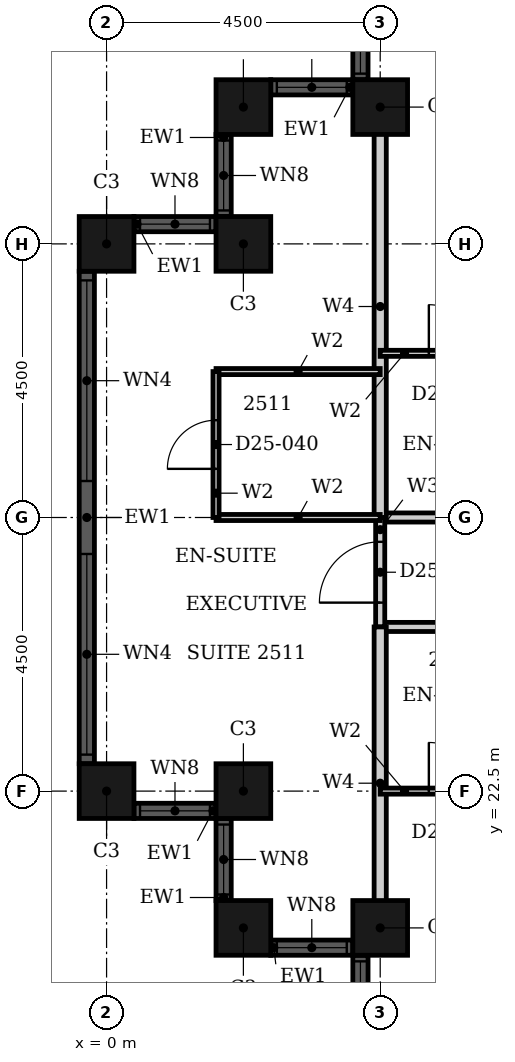
"""IFC4 building model, lengths in metres.
Left out: names, types, materials, properties, quantities, classifications, styles, units other than length and angle.
Written with IfcOpenShell. Run it as: python <this file> out.ifc"""

import sys

from ifc_helpers import new_model, si_unit, direction, frame, frame_2d, origin, origin_2d, place, context, subcontext, project, spatial, rectangle, hollow_rectangle, extrude, element, fill, save


model = new_model("IFC4")
c1 = context("Model", 3, precision=1e-05, world=origin(), true_north=direction((0.0, 1.0)))
c2 = subcontext(c1, "Body", "Model", "MODEL_VIEW")
j1 = project(units=[si_unit("LENGTHUNIT", "METRE"), si_unit("PLANEANGLEUNIT", "RADIAN")], contexts=[c1])
p1 = place(None, origin())
s1 = spatial("IfcSite", under=j1, at=p1, CompositionType="ELEMENT")
p2 = place(p1, origin())
s2 = spatial("IfcBuilding", under=s1, at=p2, CompositionType="ELEMENT")
p3 = place(p2, frame((0.0, 0.0, 104.4)))
s3 = spatial("IfcBuildingStorey", under=s2, at=p3, CompositionType="ELEMENT", Elevation=104.4)
for number, where, z_axis, x_axis in (
    (1, (4.5, 33.75, 0.0), (0.0, 0.0, 1.0), (1.0, 0.0, 0.0)),
    (2, (2.25, 33.75, 0.0), (0.0, 0.0, 1.0), (1.0, 0.0, 0.0)),
    (3, (2.25, 31.5, 0.0), (0.0, 0.0, 1.0), (1.0, 0.0, 0.0)),
    (4, (0.0, 31.5, 0.0), (0.0, 0.0, 1.0), (1.0, 0.0, 0.0)),
    (5, (0.0, 22.5, 0.0), (0.0, 0.0, 1.0), (1.0, 0.0, 0.0)),
    (6, (2.25, 22.5, 0.0), (0.0, 0.0, 1.0), (1.0, 0.0, 0.0)),
    (7, (2.25, 20.25, 0.0), (0.0, 0.0, 1.0), (1.0, 0.0, 0.0)),
    (8, (4.5, 20.25, 0.0), (0.0, 0.0, 1.0), (1.0, 0.0, 0.0)),
):
    element("IfcColumn", number, at=place(p3, frame(where, z_axis=z_axis, x_axis=x_axis)), inside=s3, PredefinedType="COLUMN", context=c2, shape_type="SweptSolid", body=[
        extrude(hollow_rectangle(XDim=0.9, YDim=0.9, WallThickness=0.028, at=origin_2d()), origin(), (0.0, 0.0, 1.0), 3.6),
    ])
p4 = place(p3, frame((4.175, 35.55, 0.0), z_axis=(0.0, 0.0, 1.0), x_axis=(0.0, -1.0, 0.0)))
e9 = element("IfcWall", 9, at=p4, inside=s3, PredefinedType="SOLIDWALL", context=c2, shape_type="SweptSolid", body=[
    extrude(rectangle(XDim=1.35, YDim=0.25, at=frame_2d((0.675, 0.0))), origin(), (0.0, 0.0, 1.0), 3.6),
])
p5 = place(p4, frame((0.1, 0.0, 0.9)))
e10 = element("IfcOpeningElement", 10, at=p5, cuts=e9, PredefinedType="OPENING", context=c2, shape_type="SweptSolid", body=[
    extrude(rectangle(XDim=1.15, YDim=2.08, at=frame_2d((0.575, 1.04))), frame((0.0, 0.135, 0.0), z_axis=(0.0, -1.0, 0.0), x_axis=(1.0, 0.0, 0.0)), (0.0, 0.0, 1.0), 0.27),
])
p6 = place(p3, frame((4.05, 34.075, 0.0), z_axis=(0.0, 0.0, 1.0), x_axis=(-1.0, 0.0, 0.0)))
e11 = element("IfcWall", 11, at=p6, inside=s3, PredefinedType="SOLIDWALL", context=c2, shape_type="SweptSolid", body=[
    extrude(rectangle(XDim=1.35, YDim=0.25, at=frame_2d((0.675, 0.0))), origin(), (0.0, 0.0, 1.0), 3.6),
])
p7 = place(p6, frame((0.1, 0.0, 0.9)))
e12 = element("IfcOpeningElement", 12, at=p7, cuts=e11, PredefinedType="OPENING", context=c2, shape_type="SweptSolid", body=[
    extrude(rectangle(XDim=1.15, YDim=2.08, at=frame_2d((0.575, 1.04))), frame((0.0, 0.135, 0.0), z_axis=(0.0, -1.0, 0.0), x_axis=(1.0, 0.0, 0.0)), (0.0, 0.0, 1.0), 0.27),
])
p8 = place(p3, frame((1.925, 33.3, 0.0), z_axis=(0.0, 0.0, 1.0), x_axis=(0.0, -1.0, 0.0)))
e13 = element("IfcWall", 13, at=p8, inside=s3, PredefinedType="SOLIDWALL", context=c2, shape_type="SweptSolid", body=[
    extrude(rectangle(XDim=1.35, YDim=0.25, at=frame_2d((0.675, 0.0))), origin(), (0.0, 0.0, 1.0), 3.6),
])
p9 = place(p8, frame((0.1, 0.0, 0.9)))
e14 = element("IfcOpeningElement", 14, at=p9, cuts=e13, PredefinedType="OPENING", context=c2, shape_type="SweptSolid", body=[
    extrude(rectangle(XDim=1.15, YDim=2.08, at=frame_2d((0.575, 1.04))), frame((0.0, 0.135, 0.0), z_axis=(0.0, -1.0, 0.0), x_axis=(1.0, 0.0, 0.0)), (0.0, 0.0, 1.0), 0.27),
])
p10 = place(p3, frame((1.8, 31.825, 0.0), z_axis=(0.0, 0.0, 1.0), x_axis=(-1.0, 0.0, 0.0)))
e15 = element("IfcWall", 15, at=p10, inside=s3, PredefinedType="SOLIDWALL", context=c2, shape_type="SweptSolid", body=[
    extrude(rectangle(XDim=1.35, YDim=0.25, at=frame_2d((0.675, 0.0))), origin(), (0.0, 0.0, 1.0), 3.6),
])
p11 = place(p10, frame((0.1, 0.0, 0.9)))
e16 = element("IfcOpeningElement", 16, at=p11, cuts=e15, PredefinedType="OPENING", context=c2, shape_type="SweptSolid", body=[
    extrude(rectangle(XDim=1.15, YDim=2.08, at=frame_2d((0.575, 1.04))), frame((0.0, 0.135, 0.0), z_axis=(0.0, -1.0, 0.0), x_axis=(1.0, 0.0, 0.0)), (0.0, 0.0, 1.0), 0.27),
])
p12 = place(p3, frame((-0.325, 31.05, 0.0), z_axis=(0.0, 0.0, 1.0), x_axis=(0.0, -1.0, 0.0)))
e17 = element("IfcWall", 17, at=p12, inside=s3, PredefinedType="SOLIDWALL", context=c2, shape_type="SweptSolid", body=[
    extrude(rectangle(XDim=8.1, YDim=0.25, at=frame_2d((4.05, 0.0))), origin(), (0.0, 0.0, 1.0), 3.6),
])
p13 = place(p12, frame((0.15, 0.0, 0.9)))
e18 = element("IfcOpeningElement", 18, at=p13, cuts=e17, PredefinedType="OPENING", context=c2, shape_type="SweptSolid", body=[
    extrude(rectangle(XDim=3.3, YDim=2.08, at=frame_2d((1.65, 1.04))), frame((0.0, 0.135, 0.0), z_axis=(0.0, -1.0, 0.0), x_axis=(1.0, 0.0, 0.0)), (0.0, 0.0, 1.0), 0.27),
])
p14 = place(p12, frame((4.65, 0.0, 0.9)))
e19 = element("IfcOpeningElement", 19, at=p14, cuts=e17, PredefinedType="OPENING", context=c2, shape_type="SweptSolid", body=[
    extrude(rectangle(XDim=3.3, YDim=2.08, at=frame_2d((1.65, 1.04))), frame((0.0, 0.135, 0.0), z_axis=(0.0, -1.0, 0.0), x_axis=(1.0, 0.0, 0.0)), (0.0, 0.0, 1.0), 0.27),
])
p15 = place(p3, frame((0.45, 22.175, 0.0), z_axis=(0.0, 0.0, 1.0), x_axis=(1.0, 0.0, 0.0)))
e20 = element("IfcWall", 20, at=p15, inside=s3, PredefinedType="SOLIDWALL", context=c2, shape_type="SweptSolid", body=[
    extrude(rectangle(XDim=1.35, YDim=0.25, at=frame_2d((0.675, 0.0))), origin(), (0.0, 0.0, 1.0), 3.6),
])
p16 = place(p15, frame((0.1, 0.0, 0.9)))
e21 = element("IfcOpeningElement", 21, at=p16, cuts=e20, PredefinedType="OPENING", context=c2, shape_type="SweptSolid", body=[
    extrude(rectangle(XDim=1.15, YDim=2.08, at=frame_2d((0.575, 1.04))), frame((0.0, 0.135, 0.0), z_axis=(0.0, -1.0, 0.0), x_axis=(1.0, 0.0, 0.0)), (0.0, 0.0, 1.0), 0.27),
])
p17 = place(p3, frame((1.925, 22.05, 0.0), z_axis=(0.0, 0.0, 1.0), x_axis=(0.0, -1.0, 0.0)))
e22 = element("IfcWall", 22, at=p17, inside=s3, PredefinedType="SOLIDWALL", context=c2, shape_type="SweptSolid", body=[
    extrude(rectangle(XDim=1.35, YDim=0.25, at=frame_2d((0.675, 0.0))), origin(), (0.0, 0.0, 1.0), 3.6),
])
p18 = place(p17, frame((0.1, 0.0, 0.9)))
e23 = element("IfcOpeningElement", 23, at=p18, cuts=e22, PredefinedType="OPENING", context=c2, shape_type="SweptSolid", body=[
    extrude(rectangle(XDim=1.15, YDim=2.08, at=frame_2d((0.575, 1.04))), frame((0.0, 0.135, 0.0), z_axis=(0.0, -1.0, 0.0), x_axis=(1.0, 0.0, 0.0)), (0.0, 0.0, 1.0), 0.27),
])
p19 = place(p3, frame((2.7, 19.925, 0.0), z_axis=(0.0, 0.0, 1.0), x_axis=(1.0, 0.0, 0.0)))
e24 = element("IfcWall", 24, at=p19, inside=s3, PredefinedType="SOLIDWALL", context=c2, shape_type="SweptSolid", body=[
    extrude(rectangle(XDim=1.35, YDim=0.25, at=frame_2d((0.675, 0.0))), origin(), (0.0, 0.0, 1.0), 3.6),
])
p20 = place(p19, frame((0.1, 0.0, 0.9)))
e25 = element("IfcOpeningElement", 25, at=p20, cuts=e24, PredefinedType="OPENING", context=c2, shape_type="SweptSolid", body=[
    extrude(rectangle(XDim=1.15, YDim=2.08, at=frame_2d((0.575, 1.04))), frame((0.0, 0.135, 0.0), z_axis=(0.0, -1.0, 0.0), x_axis=(1.0, 0.0, 0.0)), (0.0, 0.0, 1.0), 0.27),
])
p21 = place(p3, frame((4.175, 19.8, 0.0), z_axis=(0.0, 0.0, 1.0), x_axis=(0.0, -1.0, 0.0)))
e26 = element("IfcWall", 26, at=p21, inside=s3, PredefinedType="SOLIDWALL", context=c2, shape_type="SweptSolid", body=[
    extrude(rectangle(XDim=1.35, YDim=0.25, at=frame_2d((0.675, 0.0))), origin(), (0.0, 0.0, 1.0), 3.6),
])
p22 = place(p21, frame((0.1, 0.0, 0.9)))
e27 = element("IfcOpeningElement", 27, at=p22, cuts=e26, PredefinedType="OPENING", context=c2, shape_type="SweptSolid", body=[
    extrude(rectangle(XDim=1.15, YDim=2.08, at=frame_2d((0.575, 1.04))), frame((0.0, 0.135, 0.0), z_axis=(0.0, -1.0, 0.0), x_axis=(1.0, 0.0, 0.0)), (0.0, 0.0, 1.0), 0.27),
])
p23 = place(p3, frame((4.5, 25.2, 0.0), z_axis=(0.0, 0.0, 1.0), x_axis=(1.0, 0.0, 0.0)))
e28 = element("IfcWall", 28, at=p23, inside=s3, PredefinedType="PARTITIONING", context=c2, shape_type="SweptSolid", body=[
    extrude(rectangle(XDim=11.7, YDim=0.15, at=frame_2d((5.85, 0.0))), origin(), (0.0, 0.0, 1.0), 3.3),
])
p24 = place(p23, frame((7.45, 0.0, 0.0)))
e29 = element("IfcOpeningElement", 29, at=p24, cuts=e28, PredefinedType="OPENING", context=c2, shape_type="SweptSolid", body=[
    extrude(rectangle(XDim=1.0, YDim=2.1, at=frame_2d((0.5, 1.05))), frame((0.0, 0.085, 0.0), z_axis=(0.0, -1.0, 0.0), x_axis=(1.0, 0.0, 0.0)), (0.0, 0.0, 1.0), 0.17),
])
p25 = place(p23, frame((2.95, 0.0, 0.0)))
e30 = element("IfcOpeningElement", 30, at=p25, cuts=e28, PredefinedType="OPENING", context=c2, shape_type="SweptSolid", body=[
    extrude(rectangle(XDim=1.0, YDim=2.1, at=frame_2d((0.5, 1.05))), frame((0.0, 0.085, 0.0), z_axis=(0.0, -1.0, 0.0), x_axis=(1.0, 0.0, 0.0)), (0.0, 0.0, 1.0), 0.17),
])
p26 = place(p3, frame((4.5, 27.0, 0.0), z_axis=(0.0, 0.0, 1.0), x_axis=(1.0, 0.0, 0.0)))
e31 = element("IfcWall", 31, at=p26, inside=s3, PredefinedType="PARTITIONING", context=c2, shape_type="SweptSolid", body=[
    extrude(rectangle(XDim=11.7, YDim=0.15, at=frame_2d((5.85, 0.0))), origin(), (0.0, 0.0, 1.0), 2.58),
])
p27 = place(p26, frame((6.25, 0.0, 0.0)))
e32 = element("IfcOpeningElement", 32, at=p27, cuts=e31, PredefinedType="OPENING", context=c2, shape_type="SweptSolid", body=[
    extrude(rectangle(XDim=1.0, YDim=2.1, at=frame_2d((0.5, 1.05))), frame((0.0, 0.085, 0.0), z_axis=(0.0, -1.0, 0.0), x_axis=(1.0, 0.0, 0.0)), (0.0, 0.0, 1.0), 0.17),
])
p28 = place(p3, frame((4.5, 25.2, 0.0), z_axis=(0.0, 0.0, 1.0), x_axis=(0.0, 1.0, 0.0)))
e33 = element("IfcWall", 33, at=p28, inside=s3, PredefinedType="PARTITIONING", context=c2, shape_type="SweptSolid", body=[
    extrude(rectangle(XDim=1.8, YDim=0.15, at=frame_2d((0.9, 0.0))), origin(), (0.0, 0.0, 1.0), 3.3),
])
p29 = place(p28, frame((0.4, 0.0, 0.0)))
e34 = element("IfcOpeningElement", 34, at=p29, cuts=e33, PredefinedType="OPENING", context=c2, shape_type="SweptSolid", body=[
    extrude(rectangle(XDim=1.0, YDim=2.1, at=frame_2d((0.5, 1.05))), frame((0.0, 0.085, 0.0), z_axis=(0.0, -1.0, 0.0), x_axis=(1.0, 0.0, 0.0)), (0.0, 0.0, 1.0), 0.17),
])
p30 = place(p3, frame((4.5, 20.06, 0.0), z_axis=(0.0, 0.0, 1.0), x_axis=(0.0, 1.0, 0.0)))
e35 = element("IfcWall", 35, at=p30, inside=s3, PredefinedType="PARTITIONING", context=c2, shape_type="SweptSolid", body=[
    extrude(rectangle(XDim=5.14, YDim=0.2, at=frame_2d((2.57, 0.0))), origin(), (0.0, 0.0, 1.0), 3.3),
])
p31 = place(p3, frame((4.5, 27.0, 0.0), z_axis=(0.0, 0.0, 1.0), x_axis=(0.0, 1.0, 0.0)))
e36 = element("IfcWall", 36, at=p31, inside=s3, PredefinedType="PARTITIONING", context=c2, shape_type="SweptSolid", body=[
    extrude(rectangle(XDim=6.94, YDim=0.2, at=frame_2d((3.47, 0.0))), origin(), (0.0, 0.0, 1.0), 3.3),
])
p32 = place(p3, frame((4.5, 22.5, 0.0), z_axis=(0.0, 0.0, 1.0), x_axis=(1.0, 0.0, 0.0)))
e37 = element("IfcWall", 37, at=p32, inside=s3, PredefinedType="PARTITIONING", context=c2, shape_type="SweptSolid", body=[
    extrude(rectangle(XDim=2.4, YDim=0.1, at=frame_2d((1.2, 0.0))), origin(), (0.0, 0.0, 1.0), 2.58),
])
p33 = place(p32, frame((0.8, 0.0, 0.0)))
e38 = element("IfcOpeningElement", 38, at=p33, cuts=e37, PredefinedType="OPENING", context=c2, shape_type="SweptSolid", body=[
    extrude(rectangle(XDim=0.8, YDim=2.1, at=frame_2d((0.4, 1.05))), frame((0.0, 0.06, 0.0), z_axis=(0.0, -1.0, 0.0), x_axis=(1.0, 0.0, 0.0)), (0.0, 0.0, 1.0), 0.12),
])
p34 = place(p3, frame((1.8, 27.0, 0.0), z_axis=(0.0, 0.0, 1.0), x_axis=(1.0, 0.0, 0.0)))
e39 = element("IfcWall", 39, at=p34, inside=s3, PredefinedType="PARTITIONING", context=c2, shape_type="SweptSolid", body=[
    extrude(rectangle(XDim=2.7, YDim=0.1, at=frame_2d((1.35, 0.0))), origin(), (0.0, 0.0, 1.0), 2.58),
])
p35 = place(p3, frame((1.8, 29.4, 0.0), z_axis=(0.0, 0.0, 1.0), x_axis=(1.0, 0.0, 0.0)))
e40 = element("IfcWall", 40, at=p35, inside=s3, PredefinedType="PARTITIONING", context=c2, shape_type="SweptSolid", body=[
    extrude(rectangle(XDim=2.7, YDim=0.1, at=frame_2d((1.35, 0.0))), origin(), (0.0, 0.0, 1.0), 3.3),
])
p36 = place(p3, frame((4.5, 29.7, 0.0), z_axis=(0.0, 0.0, 1.0), x_axis=(1.0, 0.0, 0.0)))
e41 = element("IfcWall", 41, at=p36, inside=s3, PredefinedType="PARTITIONING", context=c2, shape_type="SweptSolid", body=[
    extrude(rectangle(XDim=2.4, YDim=0.1, at=frame_2d((1.2, 0.0))), origin(), (0.0, 0.0, 1.0), 3.3),
])
p37 = place(p36, frame((0.8, 0.0, 0.0)))
e42 = element("IfcOpeningElement", 42, at=p37, cuts=e41, PredefinedType="OPENING", context=c2, shape_type="SweptSolid", body=[
    extrude(rectangle(XDim=0.8, YDim=2.1, at=frame_2d((0.4, 1.05))), frame((0.0, 0.06, 0.0), z_axis=(0.0, -1.0, 0.0), x_axis=(1.0, 0.0, 0.0)), (0.0, 0.0, 1.0), 0.12),
])
p38 = place(p3, frame((1.8, 27.0, 0.0), z_axis=(0.0, 0.0, 1.0), x_axis=(0.0, 1.0, 0.0)))
e43 = element("IfcWall", 43, at=p38, inside=s3, PredefinedType="PARTITIONING", context=c2, shape_type="SweptSolid", body=[
    extrude(rectangle(XDim=2.4, YDim=0.1, at=frame_2d((1.2, 0.0))), origin(), (0.0, 0.0, 1.0), 3.3),
])
p39 = place(p38, frame((0.8, 0.0, 0.0)))
e44 = element("IfcOpeningElement", 44, at=p39, cuts=e43, PredefinedType="OPENING", context=c2, shape_type="SweptSolid", body=[
    extrude(rectangle(XDim=0.8, YDim=2.1, at=frame_2d((0.4, 1.05))), frame((0.0, 0.06, 0.0), z_axis=(0.0, -1.0, 0.0), x_axis=(1.0, 0.0, 0.0)), (0.0, 0.0, 1.0), 0.12),
])
p40 = place(p5, origin())
e45 = element("IfcWindow", 45, at=p40, inside=s3, PartitioningType="SINGLE_PANEL", PredefinedType="WINDOW", context=c2, shape_type="SweptSolid", body=[
    extrude(rectangle(XDim=1.15, YDim=2.08, at=frame_2d((0.575, 1.04))), frame((0.0, 0.03, 0.0), z_axis=(0.0, -1.0, 0.0), x_axis=(1.0, 0.0, 0.0)), (0.0, 0.0, 1.0), 0.06),
])
fill(e10, e45)
p41 = place(p7, origin())
e46 = element("IfcWindow", 46, at=p41, inside=s3, PartitioningType="SINGLE_PANEL", PredefinedType="WINDOW", context=c2, shape_type="SweptSolid", body=[
    extrude(rectangle(XDim=1.15, YDim=2.08, at=frame_2d((0.575, 1.04))), frame((0.0, 0.03, 0.0), z_axis=(0.0, -1.0, 0.0), x_axis=(1.0, 0.0, 0.0)), (0.0, 0.0, 1.0), 0.06),
])
fill(e12, e46)
p42 = place(p9, origin())
e47 = element("IfcWindow", 47, at=p42, inside=s3, PartitioningType="SINGLE_PANEL", PredefinedType="WINDOW", context=c2, shape_type="SweptSolid", body=[
    extrude(rectangle(XDim=1.15, YDim=2.08, at=frame_2d((0.575, 1.04))), frame((0.0, 0.03, 0.0), z_axis=(0.0, -1.0, 0.0), x_axis=(1.0, 0.0, 0.0)), (0.0, 0.0, 1.0), 0.06),
])
fill(e14, e47)
p43 = place(p11, origin())
e48 = element("IfcWindow", 48, at=p43, inside=s3, PartitioningType="SINGLE_PANEL", PredefinedType="WINDOW", context=c2, shape_type="SweptSolid", body=[
    extrude(rectangle(XDim=1.15, YDim=2.08, at=frame_2d((0.575, 1.04))), frame((0.0, 0.03, 0.0), z_axis=(0.0, -1.0, 0.0), x_axis=(1.0, 0.0, 0.0)), (0.0, 0.0, 1.0), 0.06),
])
fill(e16, e48)
p44 = place(p13, origin())
e49 = element("IfcWindow", 49, at=p44, inside=s3, PartitioningType="SINGLE_PANEL", PredefinedType="WINDOW", context=c2, shape_type="SweptSolid", body=[
    extrude(rectangle(XDim=3.3, YDim=2.08, at=frame_2d((1.65, 1.04))), frame((0.0, 0.03, 0.0), z_axis=(0.0, -1.0, 0.0), x_axis=(1.0, 0.0, 0.0)), (0.0, 0.0, 1.0), 0.06),
])
fill(e18, e49)
p45 = place(p14, origin())
e50 = element("IfcWindow", 50, at=p45, inside=s3, PartitioningType="SINGLE_PANEL", PredefinedType="WINDOW", context=c2, shape_type="SweptSolid", body=[
    extrude(rectangle(XDim=3.3, YDim=2.08, at=frame_2d((1.65, 1.04))), frame((0.0, 0.03, 0.0), z_axis=(0.0, -1.0, 0.0), x_axis=(1.0, 0.0, 0.0)), (0.0, 0.0, 1.0), 0.06),
])
fill(e19, e50)
p46 = place(p16, origin())
e51 = element("IfcWindow", 51, at=p46, inside=s3, PartitioningType="SINGLE_PANEL", PredefinedType="WINDOW", context=c2, shape_type="SweptSolid", body=[
    extrude(rectangle(XDim=1.15, YDim=2.08, at=frame_2d((0.575, 1.04))), frame((0.0, 0.03, 0.0), z_axis=(0.0, -1.0, 0.0), x_axis=(1.0, 0.0, 0.0)), (0.0, 0.0, 1.0), 0.06),
])
fill(e21, e51)
p47 = place(p18, origin())
e52 = element("IfcWindow", 52, at=p47, inside=s3, PartitioningType="SINGLE_PANEL", PredefinedType="WINDOW", context=c2, shape_type="SweptSolid", body=[
    extrude(rectangle(XDim=1.15, YDim=2.08, at=frame_2d((0.575, 1.04))), frame((0.0, 0.03, 0.0), z_axis=(0.0, -1.0, 0.0), x_axis=(1.0, 0.0, 0.0)), (0.0, 0.0, 1.0), 0.06),
])
fill(e23, e52)
p48 = place(p20, origin())
e53 = element("IfcWindow", 53, at=p48, inside=s3, PartitioningType="SINGLE_PANEL", PredefinedType="WINDOW", context=c2, shape_type="SweptSolid", body=[
    extrude(rectangle(XDim=1.15, YDim=2.08, at=frame_2d((0.575, 1.04))), frame((0.0, 0.03, 0.0), z_axis=(0.0, -1.0, 0.0), x_axis=(1.0, 0.0, 0.0)), (0.0, 0.0, 1.0), 0.06),
])
fill(e25, e53)
p49 = place(p22, origin())
e54 = element("IfcWindow", 54, at=p49, inside=s3, PartitioningType="SINGLE_PANEL", PredefinedType="WINDOW", context=c2, shape_type="SweptSolid", body=[
    extrude(rectangle(XDim=1.15, YDim=2.08, at=frame_2d((0.575, 1.04))), frame((0.0, 0.03, 0.0), z_axis=(0.0, -1.0, 0.0), x_axis=(1.0, 0.0, 0.0)), (0.0, 0.0, 1.0), 0.06),
])
fill(e27, e54)
p50 = place(p33, origin())
e55 = element("IfcDoor", 55, at=p50, inside=s3, OperationType="SINGLE_SWING_RIGHT", PredefinedType="DOOR", context=c2, shape_type="SweptSolid", body=[
    extrude(rectangle(XDim=0.8, YDim=2.1, at=frame_2d((0.4, 1.05))), frame((0.0, 0.025, 0.0), z_axis=(0.0, -1.0, 0.0), x_axis=(1.0, 0.0, 0.0)), (0.0, 0.0, 1.0), 0.05),
])
fill(e38, e55)
p51 = place(p37, origin())
e56 = element("IfcDoor", 56, at=p51, inside=s3, OperationType="SINGLE_SWING_LEFT", PredefinedType="DOOR", context=c2, shape_type="SweptSolid", body=[
    extrude(rectangle(XDim=0.8, YDim=2.1, at=frame_2d((0.4, 1.05))), frame((0.0, 0.025, 0.0), z_axis=(0.0, -1.0, 0.0), x_axis=(1.0, 0.0, 0.0)), (0.0, 0.0, 1.0), 0.05),
])
fill(e42, e56)
p52 = place(p29, origin())
e57 = element("IfcDoor", 57, at=p52, inside=s3, OperationType="SINGLE_SWING_RIGHT", PredefinedType="DOOR", context=c2, shape_type="SweptSolid", body=[
    extrude(rectangle(XDim=1.0, YDim=2.1, at=frame_2d((0.5, 1.05))), frame((0.0, 0.025, 0.0), z_axis=(0.0, -1.0, 0.0), x_axis=(1.0, 0.0, 0.0)), (0.0, 0.0, 1.0), 0.05),
])
fill(e34, e57)
p53 = place(p39, origin())
e58 = element("IfcDoor", 58, at=p53, inside=s3, OperationType="SINGLE_SWING_LEFT", PredefinedType="DOOR", context=c2, shape_type="SweptSolid", body=[
    extrude(rectangle(XDim=0.8, YDim=2.1, at=frame_2d((0.4, 1.05))), frame((0.0, 0.025, 0.0), z_axis=(0.0, -1.0, 0.0), x_axis=(1.0, 0.0, 0.0)), (0.0, 0.0, 1.0), 0.05),
])
fill(e44, e58)
save(model, sys.argv[1])
